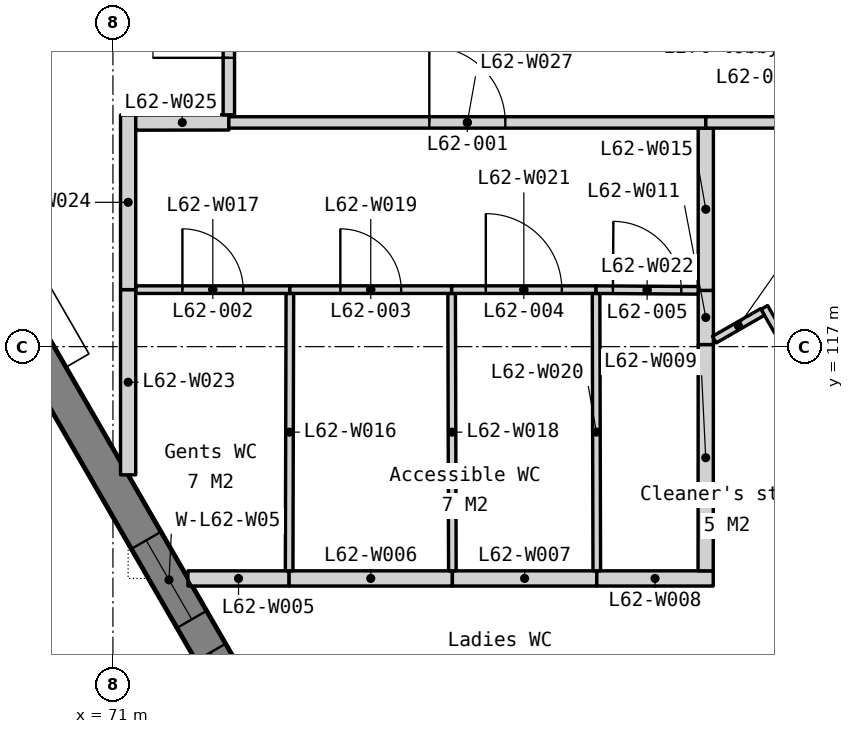
"""IFC4 building model, lengths in metres.
Left out: names, types, materials, properties, quantities, classifications, styles, units other than length and angle.
Written with IfcOpenShell. Run it as: python <this file> out.ifc"""

import sys

from ifc_helpers import new_model, si_unit, direction, frame, frame_2d, origin, place, context, subcontext, project, spatial, polyline, rectangle, outline, extrude, element, fill, save


model = new_model("IFC4")
c1 = context("Model", 3, precision=1e-05, world=origin(), true_north=direction((0.0, 1.0)))
c2 = subcontext(c1, "Body", "Model", "MODEL_VIEW")
j1 = project(units=[si_unit("LENGTHUNIT", "METRE"), si_unit("PLANEANGLEUNIT", "RADIAN")], contexts=[c1])
p1 = place(None, origin())
s1 = spatial("IfcSite", under=j1, at=p1, CompositionType="ELEMENT")
p2 = place(p1, origin())
s2 = spatial("IfcBuilding", under=s1, at=p2, CompositionType="ELEMENT")
p3 = place(p2, frame((0.0, 0.0, 254.3)))
s3 = spatial("IfcBuildingStorey", under=s2, at=p3, CompositionType="ELEMENT", Elevation=254.3)
p4 = place(p3, frame((60.609, 133.207, -0.15), z_axis=(0.0, 0.0, 1.0), x_axis=(0.500002536638, -0.866023939251, 0.0)))
e1 = element("IfcWall", 1, at=p4, inside=s3, PredefinedType="SOLIDWALL", context=c2, shape_type="SweptSolid", body=[
    extrude(outline(polyline([(36.972, 0.0), (36.972, 3.9), (0.0, 3.9), (0.0, 0.0), (36.972, 0.0)])), frame((0.0, 0.225, 0.0), z_axis=(0.0, -1.0, 0.0), x_axis=(1.0, 0.0, 0.0)), (0.0, 0.0, 1.0), 0.45),
])
p5 = place(p4, frame((3.172, 0.0, 0.95)))
e2 = element("IfcOpeningElement", 2, at=p5, cuts=e1, PredefinedType="OPENING", context=c2, shape_type="SweptSolid", body=[
    extrude(rectangle(XDim=1.2, YDim=2.2, at=frame_2d((0.6, 1.1))), frame((0.0, 0.235, 0.0), z_axis=(0.0, -1.0, 0.0), x_axis=(1.0, 0.0, 0.0)), (0.0, 0.0, 1.0), 0.47),
])
p6 = place(p4, frame((4.872, 0.0, 0.95)))
e3 = element("IfcOpeningElement", 3, at=p6, cuts=e1, PredefinedType="OPENING", context=c2, shape_type="SweptSolid", body=[
    extrude(rectangle(XDim=1.2, YDim=2.2, at=frame_2d((0.6, 1.1))), frame((0.0, 0.235, 0.0), z_axis=(0.0, -1.0, 0.0), x_axis=(1.0, 0.0, 0.0)), (0.0, 0.0, 1.0), 0.47),
])
p7 = place(p4, frame((12.415, 0.0, 0.95)))
e4 = element("IfcOpeningElement", 4, at=p7, cuts=e1, PredefinedType="OPENING", context=c2, shape_type="SweptSolid", body=[
    extrude(rectangle(XDim=1.2, YDim=2.2, at=frame_2d((0.6, 1.1))), frame((0.0, 0.235, 0.0), z_axis=(0.0, -1.0, 0.0), x_axis=(1.0, 0.0, 0.0)), (0.0, 0.0, 1.0), 0.47),
])
p8 = place(p4, frame((14.115, 0.0, 0.95)))
e5 = element("IfcOpeningElement", 5, at=p8, cuts=e1, PredefinedType="OPENING", context=c2, shape_type="SweptSolid", body=[
    extrude(rectangle(XDim=1.2, YDim=2.2, at=frame_2d((0.6, 1.1))), frame((0.0, 0.235, 0.0), z_axis=(0.0, -1.0, 0.0), x_axis=(1.0, 0.0, 0.0)), (0.0, 0.0, 1.0), 0.47),
])
p9 = place(p4, frame((21.658, 0.0, 0.95)))
e6 = element("IfcOpeningElement", 6, at=p9, cuts=e1, PredefinedType="OPENING", context=c2, shape_type="SweptSolid", body=[
    extrude(rectangle(XDim=1.2, YDim=2.2, at=frame_2d((0.6, 1.1))), frame((0.0, 0.235, 0.0), z_axis=(0.0, -1.0, 0.0), x_axis=(1.0, 0.0, 0.0)), (0.0, 0.0, 1.0), 0.47),
])
p10 = place(p4, frame((23.358, 0.0, 0.95)))
e7 = element("IfcOpeningElement", 7, at=p10, cuts=e1, PredefinedType="OPENING", context=c2, shape_type="SweptSolid", body=[
    extrude(rectangle(XDim=1.2, YDim=2.2, at=frame_2d((0.6, 1.1))), frame((0.0, 0.235, 0.0), z_axis=(0.0, -1.0, 0.0), x_axis=(1.0, 0.0, 0.0)), (0.0, 0.0, 1.0), 0.47),
])
p11 = place(p4, frame((30.901, 0.0, 0.95)))
e8 = element("IfcOpeningElement", 8, at=p11, cuts=e1, PredefinedType="OPENING", context=c2, shape_type="SweptSolid", body=[
    extrude(rectangle(XDim=1.2, YDim=2.2, at=frame_2d((0.6, 1.1))), frame((0.0, 0.235, 0.0), z_axis=(0.0, -1.0, 0.0), x_axis=(1.0, 0.0, 0.0)), (0.0, 0.0, 1.0), 0.47),
])
p12 = place(p4, frame((32.601, 0.0, 0.95)))
e9 = element("IfcOpeningElement", 9, at=p12, cuts=e1, PredefinedType="OPENING", context=c2, shape_type="SweptSolid", body=[
    extrude(rectangle(XDim=1.2, YDim=2.2, at=frame_2d((0.6, 1.1))), frame((0.0, 0.235, 0.0), z_axis=(0.0, -1.0, 0.0), x_axis=(1.0, 0.0, 0.0)), (0.0, 0.0, 1.0), 0.47),
])
p13 = place(p3, frame((71.987, 113.95, 0.0), z_axis=(0.0, 0.0, 1.0), x_axis=(1.0, 0.0, 0.0)))
e10 = element("IfcWall", 10, at=p13, inside=s3, PredefinedType="PARTITIONING", context=c2, shape_type="SweptSolid", body=[
    extrude(rectangle(XDim=1.331, YDim=0.2, at=frame_2d((0.666, 0.0))), origin(), (0.0, 0.0, 1.0), 3.75),
])
p14 = place(p3, frame((73.318, 113.95, 0.0), z_axis=(0.0, 0.0, 1.0), x_axis=(1.0, 0.0, 0.0)))
e11 = element("IfcWall", 11, at=p14, inside=s3, PredefinedType="PARTITIONING", context=c2, shape_type="SweptSolid", body=[
    extrude(rectangle(XDim=2.148, YDim=0.2, at=frame_2d((1.074, 0.0))), origin(), (0.0, 0.0, 1.0), 3.75),
])
p15 = place(p3, frame((75.466, 113.95, 0.0), z_axis=(0.0, 0.0, 1.0), x_axis=(1.0, 0.0, 0.0)))
e12 = element("IfcWall", 12, at=p15, inside=s3, PredefinedType="PARTITIONING", context=c2, shape_type="SweptSolid", body=[
    extrude(rectangle(XDim=1.9, YDim=0.2, at=frame_2d((0.95, 0.0))), origin(), (0.0, 0.0, 1.0), 3.75),
])
p16 = place(p3, frame((77.366, 113.95, 0.0), z_axis=(0.0, 0.0, 1.0), x_axis=(1.0, 0.0, 0.0)))
e13 = element("IfcWall", 13, at=p16, inside=s3, PredefinedType="PARTITIONING", context=c2, shape_type="SweptSolid", body=[
    extrude(rectangle(XDim=1.532, YDim=0.2, at=frame_2d((0.766, 0.0))), origin(), (0.0, 0.0, 1.0), 3.75),
])
p17 = place(p3, frame((78.798, 114.05, 0.0), z_axis=(0.0, 0.0, 1.0), x_axis=(0.000656006419, 0.999999784828, 0.0)))
e14 = element("IfcWall", 14, at=p17, inside=s3, PredefinedType="PARTITIONING", context=c2, shape_type="SweptSolid", body=[
    extrude(rectangle(XDim=2.977, YDim=0.2, at=frame_2d((1.489, 0.0))), origin(), (0.0, 0.0, 1.0), 3.75),
])
p18 = place(p3, frame((79.57, 117.516, 0.0), z_axis=(0.0, 0.0, 1.0), x_axis=(0.499861615673, -0.866105285272, 0.0)))
e15 = element("IfcWall", 15, at=p18, inside=s3, PredefinedType="PARTITIONING", context=c2, shape_type="SweptSolid", body=[
    extrude(rectangle(XDim=0.861, YDim=0.1, at=frame_2d((0.43, 0.0))), origin(), (0.0, 0.0, 1.0), 3.75),
])
p19 = place(p3, frame((78.8, 117.027, 0.0), z_axis=(0.0, 0.0, 1.0), x_axis=(0.0, 1.0, 0.0)))
e16 = element("IfcWall", 16, at=p19, inside=s3, PredefinedType="PARTITIONING", context=c2, shape_type="SweptSolid", body=[
    extrude(rectangle(XDim=0.713, YDim=0.2, at=frame_2d((0.356, 0.0))), origin(), (0.0, 0.0, 1.0), 3.75),
])
p20 = place(p3, frame((78.913, 117.092, 0.0), z_axis=(0.0, 0.0, 1.0), x_axis=(0.867068692485, 0.498188601347, 0.0)))
e17 = element("IfcWall", 17, at=p20, inside=s3, PredefinedType="PARTITIONING", context=c2, shape_type="SweptSolid", body=[
    extrude(rectangle(XDim=0.731, YDim=0.1, at=frame_2d((0.365, 0.0))), origin(), (0.0, 0.0, 1.0), 3.75),
])
p21 = place(p3, frame((78.8, 117.74, 0.0), z_axis=(0.0, 0.0, 1.0), x_axis=(0.0, 1.0, 0.0)))
e18 = element("IfcWall", 18, at=p21, inside=s3, PredefinedType="PARTITIONING", context=c2, shape_type="SweptSolid", body=[
    extrude(rectangle(XDim=2.135, YDim=0.2, at=frame_2d((1.067, 0.0))), origin(), (0.0, 0.0, 1.0), 3.75),
])
p22 = place(p3, frame((73.318, 114.05, 0.0), z_axis=(0.0, 0.0, 1.0), x_axis=(0.002608686776, 0.999996597371, 0.0)))
e19 = element("IfcWall", 19, at=p22, inside=s3, PredefinedType="PARTITIONING", context=c2, shape_type="SweptSolid", body=[
    extrude(rectangle(XDim=3.65, YDim=0.1, at=frame_2d((1.825, 0.0))), origin(), (0.0, 0.0, 1.0), 3.75),
])
p23 = place(p3, frame((71.3, 117.75, 0.0), z_axis=(0.0, 0.0, 1.0), x_axis=(1.0, 0.0, 0.0)))
e20 = element("IfcWall", 20, at=p23, inside=s3, PredefinedType="PARTITIONING", context=c2, shape_type="SweptSolid", body=[
    extrude(rectangle(XDim=2.028, YDim=0.1, at=frame_2d((1.014, 0.0))), origin(), (0.0, 0.0, 1.0), 3.75),
])
p24 = place(p23, frame((0.614, 0.0, 0.0)))
e21 = element("IfcOpeningElement", 21, at=p24, cuts=e20, PredefinedType="OPENING", context=c2, shape_type="SweptSolid", body=[
    extrude(rectangle(XDim=0.8, YDim=2.1, at=frame_2d((0.4, 1.05))), frame((0.0, 0.06, 0.0), z_axis=(0.0, -1.0, 0.0), x_axis=(1.0, 0.0, 0.0)), (0.0, 0.0, 1.0), 0.12),
])
p25 = place(p3, frame((75.466, 114.05, 0.0), z_axis=(0.0, 0.0, 1.0), x_axis=(-0.002675575707, 0.999996420641, 0.0)))
e22 = element("IfcWall", 22, at=p25, inside=s3, PredefinedType="PARTITIONING", context=c2, shape_type="SweptSolid", body=[
    extrude(rectangle(XDim=3.65, YDim=0.1, at=frame_2d((1.825, 0.0))), origin(), (0.0, 0.0, 1.0), 3.75),
])
p26 = place(p3, frame((73.328, 117.75, 0.0), z_axis=(0.0, 0.0, 1.0), x_axis=(1.0, 0.0, 0.0)))
e23 = element("IfcWall", 23, at=p26, inside=s3, PredefinedType="PARTITIONING", context=c2, shape_type="SweptSolid", body=[
    extrude(rectangle(XDim=2.128, YDim=0.1, at=frame_2d((1.064, 0.0))), origin(), (0.0, 0.0, 1.0), 3.75),
])
p27 = place(p26, frame((0.664, 0.0, 0.0)))
e24 = element("IfcOpeningElement", 24, at=p27, cuts=e23, PredefinedType="OPENING", context=c2, shape_type="SweptSolid", body=[
    extrude(rectangle(XDim=0.8, YDim=2.1, at=frame_2d((0.4, 1.05))), frame((0.0, 0.06, 0.0), z_axis=(0.0, -1.0, 0.0), x_axis=(1.0, 0.0, 0.0)), (0.0, 0.0, 1.0), 0.12),
])
p28 = place(p3, frame((77.366, 114.05, 0.0), z_axis=(0.0, 0.0, 1.0), x_axis=(-0.002608686776, 0.999996597371, 0.0)))
e25 = element("IfcWall", 25, at=p28, inside=s3, PredefinedType="PARTITIONING", context=c2, shape_type="SweptSolid", body=[
    extrude(rectangle(XDim=3.65, YDim=0.1, at=frame_2d((1.825, 0.0))), origin(), (0.0, 0.0, 1.0), 3.75),
])
p29 = place(p3, frame((75.456, 117.75, 0.0), z_axis=(0.0, 0.0, 1.0), x_axis=(1.0, 0.0, 0.0)))
e26 = element("IfcWall", 26, at=p29, inside=s3, PredefinedType="PARTITIONING", context=c2, shape_type="SweptSolid", body=[
    extrude(rectangle(XDim=1.9, YDim=0.1, at=frame_2d((0.95, 0.0))), origin(), (0.0, 0.0, 1.0), 3.75),
])
p30 = place(p29, frame((0.45, 0.0, 0.0)))
e27 = element("IfcOpeningElement", 27, at=p30, cuts=e26, PredefinedType="OPENING", context=c2, shape_type="SweptSolid", body=[
    extrude(rectangle(XDim=1.0, YDim=2.1, at=frame_2d((0.5, 1.05))), frame((0.0, 0.06, 0.0), z_axis=(0.0, -1.0, 0.0), x_axis=(1.0, 0.0, 0.0)), (0.0, 0.0, 1.0), 0.12),
])
p31 = place(p3, frame((77.356, 117.75, 0.0), z_axis=(0.0, 0.0, 1.0), x_axis=(0.99997617642, -0.006902651172, 0.0)))
e28 = element("IfcWall", 28, at=p31, inside=s3, PredefinedType="PARTITIONING", context=c2, shape_type="SweptSolid", body=[
    extrude(rectangle(XDim=1.344, YDim=0.1, at=frame_2d((0.672, 0.0))), origin(), (0.0, 0.0, 1.0), 3.75),
])
p32 = place(p31, frame((0.222, 0.0, 0.0)))
e29 = element("IfcOpeningElement", 29, at=p32, cuts=e28, PredefinedType="OPENING", context=c2, shape_type="SweptSolid", body=[
    extrude(rectangle(XDim=0.9, YDim=2.1, at=frame_2d((0.45, 1.05))), frame((0.0, 0.06, 0.0), z_axis=(0.0, -1.0, 0.0), x_axis=(1.0, 0.0, 0.0)), (0.0, 0.0, 1.0), 0.12),
])
p33 = place(p3, frame((71.2, 115.313, 0.0), z_axis=(0.0, 0.0, 1.0), x_axis=(0.0, 1.0, 0.0)))
e30 = element("IfcWall", 30, at=p33, inside=s3, PredefinedType="PARTITIONING", context=c2, shape_type="SweptSolid", body=[
    extrude(rectangle(XDim=2.437, YDim=0.2, at=frame_2d((1.218, 0.0))), origin(), (0.0, 0.0, 1.0), 3.75),
])
p34 = place(p3, frame((71.2, 117.75, 0.0), z_axis=(0.0, 0.0, 1.0), x_axis=(0.0, 1.0, 0.0)))
e31 = element("IfcWall", 31, at=p34, inside=s3, PredefinedType="PARTITIONING", context=c2, shape_type="SweptSolid", body=[
    extrude(rectangle(XDim=2.298, YDim=0.2, at=frame_2d((1.149, 0.0))), origin(), (0.0, 0.0, 1.0), 3.75),
])
p35 = place(p3, frame((71.3, 119.948, 0.0), z_axis=(0.0, 0.0, 1.0), x_axis=(0.999998728662, 0.001594576406, 0.0)))
e32 = element("IfcWall", 32, at=p35, inside=s3, PredefinedType="PARTITIONING", context=c2, shape_type="SweptSolid", body=[
    extrude(rectangle(XDim=1.225, YDim=0.2, at=frame_2d((0.612, 0.0))), origin(), (0.0, 0.0, 1.0), 3.75),
])
p36 = place(p3, frame((72.525, 120.05, 0.0), z_axis=(0.0, 0.0, 1.0), x_axis=(0.0, 1.0, 0.0)))
e33 = element("IfcWall", 33, at=p36, inside=s3, PredefinedType="PARTITIONING", context=c2, shape_type="SweptSolid", body=[
    extrude(rectangle(XDim=2.5, YDim=0.15, at=frame_2d((1.25, 0.0))), origin(), (0.0, 0.0, 1.0), 3.75),
])
p37 = place(p36, frame((0.75, 0.0, 0.0)))
e34 = element("IfcOpeningElement", 34, at=p37, cuts=e33, PredefinedType="OPENING", context=c2, shape_type="SweptSolid", body=[
    extrude(rectangle(XDim=1.0, YDim=2.1, at=frame_2d((0.5, 1.05))), frame((0.0, 0.085, 0.0), z_axis=(0.0, -1.0, 0.0), x_axis=(1.0, 0.0, 0.0)), (0.0, 0.0, 1.0), 0.17),
])
p38 = place(p3, frame((72.525, 119.95, 0.0), z_axis=(0.0, 0.0, 1.0), x_axis=(1.0, 0.0, 0.0)))
e35 = element("IfcWall", 35, at=p38, inside=s3, PredefinedType="PARTITIONING", context=c2, shape_type="SweptSolid", body=[
    extrude(rectangle(XDim=6.275, YDim=0.15, at=frame_2d((3.138, 0.0))), origin(), (0.0, 0.0, 1.0), 3.75),
])
p39 = place(p38, frame((2.637, 0.0, 0.0)))
e36 = element("IfcOpeningElement", 36, at=p39, cuts=e35, PredefinedType="OPENING", context=c2, shape_type="SweptSolid", body=[
    extrude(rectangle(XDim=1.0, YDim=2.1, at=frame_2d((0.5, 1.05))), frame((0.0, 0.085, 0.0), z_axis=(0.0, -1.0, 0.0), x_axis=(1.0, 0.0, 0.0)), (0.0, 0.0, 1.0), 0.17),
])
p40 = place(p3, frame((78.8, 119.95, 0.0), z_axis=(0.0, 0.0, 1.0), x_axis=(1.0, 0.0, 0.0)))
e37 = element("IfcWall", 37, at=p40, inside=s3, PredefinedType="PARTITIONING", context=c2, shape_type="SweptSolid", body=[
    extrude(rectangle(XDim=6.581, YDim=0.15, at=frame_2d((3.291, 0.0))), origin(), (0.0, 0.0, 1.0), 3.75),
])
p41 = place(p40, frame((2.791, 0.0, 0.0)))
e38 = element("IfcOpeningElement", 38, at=p41, cuts=e37, PredefinedType="OPENING", context=c2, shape_type="SweptSolid", body=[
    extrude(rectangle(XDim=1.0, YDim=2.1, at=frame_2d((0.5, 1.05))), frame((0.0, 0.085, 0.0), z_axis=(0.0, -1.0, 0.0), x_axis=(1.0, 0.0, 0.0)), (0.0, 0.0, 1.0), 0.17),
])
p42 = place(p9, origin())
e39 = element("IfcWindow", 39, at=p42, inside=s3, PartitioningType="SINGLE_PANEL", PredefinedType="WINDOW", context=c2, shape_type="SweptSolid", body=[
    extrude(rectangle(XDim=1.2, YDim=2.2, at=frame_2d((0.6, 1.1))), frame((0.0, 0.03, 0.0), z_axis=(0.0, -1.0, 0.0), x_axis=(1.0, 0.0, 0.0)), (0.0, 0.0, 1.0), 0.06),
])
fill(e6, e39)
p43 = place(p10, origin())
e40 = element("IfcWindow", 40, at=p43, inside=s3, PartitioningType="SINGLE_PANEL", PredefinedType="WINDOW", context=c2, shape_type="SweptSolid", body=[
    extrude(rectangle(XDim=1.2, YDim=2.2, at=frame_2d((0.6, 1.1))), frame((0.0, 0.03, 0.0), z_axis=(0.0, -1.0, 0.0), x_axis=(1.0, 0.0, 0.0)), (0.0, 0.0, 1.0), 0.06),
])
fill(e7, e40)
p44 = place(p39, origin())
e41 = element("IfcDoor", 41, at=p44, inside=s3, OperationType="SINGLE_SWING_LEFT", PredefinedType="DOOR", context=c2, shape_type="SweptSolid", body=[
    extrude(rectangle(XDim=1.0, YDim=2.1, at=frame_2d((0.5, 1.05))), frame((0.0, 0.025, 0.0), z_axis=(0.0, -1.0, 0.0), x_axis=(1.0, 0.0, 0.0)), (0.0, 0.0, 1.0), 0.05),
])
fill(e36, e41)
p45 = place(p24, origin())
e42 = element("IfcDoor", 42, at=p45, inside=s3, OperationType="SINGLE_SWING_LEFT", PredefinedType="DOOR", context=c2, shape_type="SweptSolid", body=[
    extrude(rectangle(XDim=0.8, YDim=2.1, at=frame_2d((0.4, 1.05))), frame((0.0, 0.025, 0.0), z_axis=(0.0, -1.0, 0.0), x_axis=(1.0, 0.0, 0.0)), (0.0, 0.0, 1.0), 0.05),
])
fill(e21, e42)
p46 = place(p27, origin())
e43 = element("IfcDoor", 43, at=p46, inside=s3, OperationType="SINGLE_SWING_LEFT", PredefinedType="DOOR", context=c2, shape_type="SweptSolid", body=[
    extrude(rectangle(XDim=0.8, YDim=2.1, at=frame_2d((0.4, 1.05))), frame((0.0, 0.025, 0.0), z_axis=(0.0, -1.0, 0.0), x_axis=(1.0, 0.0, 0.0)), (0.0, 0.0, 1.0), 0.05),
])
fill(e24, e43)
p47 = place(p30, origin())
e44 = element("IfcDoor", 44, at=p47, inside=s3, OperationType="SINGLE_SWING_LEFT", PredefinedType="DOOR", context=c2, shape_type="SweptSolid", body=[
    extrude(rectangle(XDim=1.0, YDim=2.1, at=frame_2d((0.5, 1.05))), frame((0.0, 0.025, 0.0), z_axis=(0.0, -1.0, 0.0), x_axis=(1.0, 0.0, 0.0)), (0.0, 0.0, 1.0), 0.05),
])
fill(e27, e44)
p48 = place(p32, origin())
e45 = element("IfcDoor", 45, at=p48, inside=s3, OperationType="SINGLE_SWING_LEFT", PredefinedType="DOOR", context=c2, shape_type="SweptSolid", body=[
    extrude(rectangle(XDim=0.9, YDim=2.1, at=frame_2d((0.45, 1.05))), frame((0.0, 0.025, 0.0), z_axis=(0.0, -1.0, 0.0), x_axis=(1.0, 0.0, 0.0)), (0.0, 0.0, 1.0), 0.05),
])
fill(e29, e45)
p49 = place(p37, origin())
e46 = element("IfcDoor", 46, at=p49, inside=s3, OperationType="SINGLE_SWING_LEFT", PredefinedType="DOOR", context=c2, shape_type="SweptSolid", body=[
    extrude(rectangle(XDim=1.0, YDim=2.1, at=frame_2d((0.5, 1.05))), frame((0.0, 0.025, 0.0), z_axis=(0.0, -1.0, 0.0), x_axis=(1.0, 0.0, 0.0)), (0.0, 0.0, 1.0), 0.05),
])
fill(e34, e46)
save(model, sys.argv[1])
